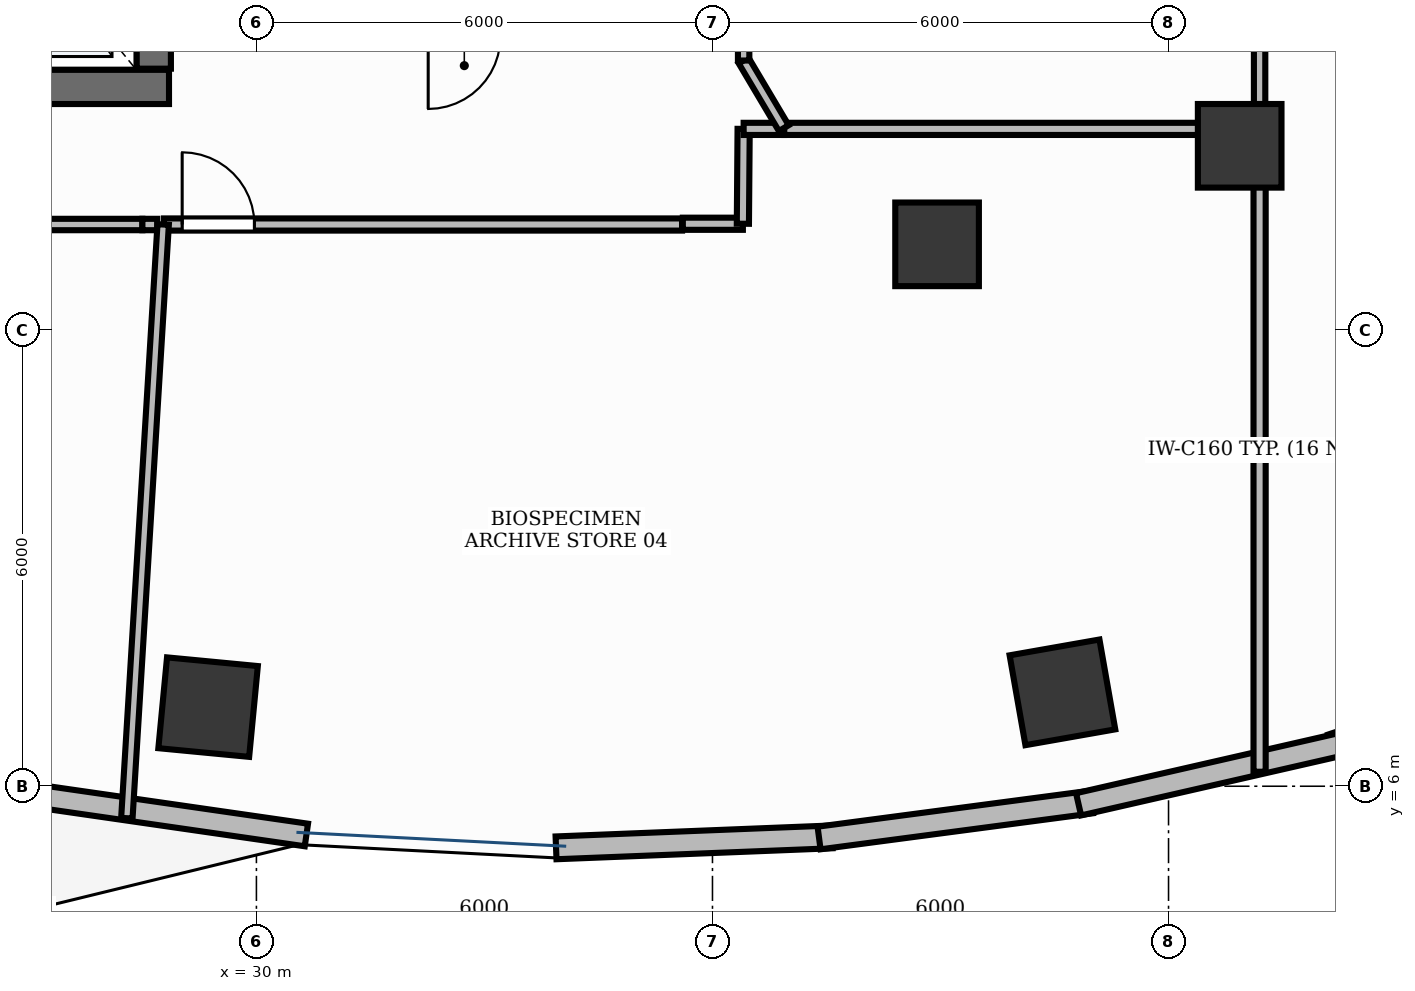
"""IFC4 building model, lengths in metres.
Left out: names, types, materials, properties, quantities, classifications, styles, units other than length and angle.
Written with IfcOpenShell. Run it as: python <this file> out.ifc"""

import sys

from ifc_helpers import new_model, si_unit, direction, frame, frame_2d, origin, origin_2d, place, context, subcontext, project, spatial, rectangle, extrude, element, fill, save


model = new_model("IFC4")
c1 = context("Model", 3, precision=1e-05, world=origin(), true_north=direction((0.0, 1.0)))
c2 = subcontext(c1, "Body", "Model", "MODEL_VIEW")
j1 = project(units=[si_unit("LENGTHUNIT", "METRE"), si_unit("PLANEANGLEUNIT", "RADIAN")], contexts=[c1])
p1 = place(None, origin())
s1 = spatial("IfcSite", under=j1, at=p1, CompositionType="ELEMENT")
p2 = place(p1, origin())
s2 = spatial("IfcBuilding", under=s1, at=p2, CompositionType="ELEMENT")
p3 = place(p2, frame((0.0, 0.0, 144.6)))
s3 = spatial("IfcBuildingStorey", under=s2, at=p3, CompositionType="ELEMENT", Elevation=144.6)
p4 = place(p3, frame((25.75, 15.2, 0.0), z_axis=(0.0, 0.0, 1.0), x_axis=(1.0, 0.0, 0.0)))
e1 = element("IfcWall", 1, at=p4, inside=s3, PredefinedType="SHEAR", context=c2, shape_type="SweptSolid", body=[
    extrude(rectangle(XDim=3.1, YDim=0.45, at=frame_2d((1.55, 0.0))), origin(), (0.0, 0.0, 1.0), 3.88),
])
p5 = place(p3, frame((28.65, 15.44, 0.0), z_axis=(0.0, 0.0, 1.0), x_axis=(0.0, 1.0, 0.0)))
e2 = element("IfcWall", 2, at=p5, inside=s3, PredefinedType="SHEAR", context=c2, shape_type="SweptSolid", body=[
    extrude(rectangle(XDim=2.7, YDim=0.45, at=frame_2d((1.35, 0.0))), origin(), (0.0, 0.0, 1.0), 3.88),
])
for number, where, z_axis, x_axis in (
    (3, (29.364, 7.041, -0.0), (0.0, 0.0, 1.0), (-0.995, 0.095, 0.0)),
    (4, (40.604, 7.235, -0.0), (0.0, 0.0, 1.0), (0.985, 0.173, 0.0)),
):
    element("IfcColumn", number, at=place(p3, frame(where, z_axis=z_axis, x_axis=x_axis)), inside=s3, PredefinedType="COLUMN", context=c2, shape_type="SweptSolid", body=[
        extrude(rectangle(XDim=1.2, YDim=1.2, at=origin_2d()), origin(), (0.0, 0.0, 1.0), 3.881),
    ])
for number, where, z_axis, x_axis in (
    (5, (38.955, 13.129, -0.0), (0.0, 0.0, 1.0), (1.0, 0.0, 0.0)),
    (6, (42.936, 14.425, -0.0), (0.0, 0.0, 1.0), (1.0, 0.0, 0.0)),
):
    element("IfcColumn", number, at=place(p3, frame(where, z_axis=z_axis, x_axis=x_axis)), inside=s3, PredefinedType="COLUMN", context=c2, shape_type="SweptSolid", body=[
        extrude(rectangle(XDim=1.1, YDim=1.1, at=origin_2d()), origin(), (0.0, 0.0, 1.0), 3.881),
    ])
p6 = place(p3, frame((44.147, 6.538, 0.0), z_axis=(0.0, 0.0, 1.0), x_axis=(0.948949854506, 0.315426970364, 0.0)))
e7 = element("IfcWall", 7, at=p6, inside=s3, PredefinedType="STANDARD", context=c2, shape_type="SweptSolid", body=[
    extrude(rectangle(XDim=3.476, YDim=0.3, at=frame_2d((1.738, 0.0))), origin(), (0.0, 0.0, 1.0), 3.88),
])
p7 = place(p6, frame((0.838, 0.0, 0.9)))
e8 = element("IfcOpeningElement", 8, at=p7, cuts=e7, PredefinedType="OPENING", context=c2, shape_type="SweptSolid", body=[
    extrude(rectangle(XDim=1.8, YDim=2.1, at=frame_2d((0.9, 1.05))), frame((0.0, 0.165, 0.0), z_axis=(0.0, -1.0, 0.0), x_axis=(1.0, 0.0, 0.0)), (0.0, 0.0, 1.0), 0.33),
])
p8 = place(p3, frame((27.083, 5.875, 0.0), z_axis=(0.0, 0.0, 1.0), x_axis=(0.989734732902, -0.142916613754, 0.0)))
e9 = element("IfcWall", 9, at=p8, inside=s3, PredefinedType="STANDARD", context=c2, shape_type="SweptSolid", body=[
    extrude(rectangle(XDim=3.611, YDim=0.3, at=frame_2d((1.806, 0.0))), origin(), (0.0, 0.0, 1.0), 3.88),
])
p9 = place(p3, frame((33.942, 5.189, 0.0), z_axis=(0.0, 0.0, 1.0), x_axis=(0.999212076676, 0.039689114679, 0.0)))
e10 = element("IfcWall", 10, at=p9, inside=s3, PredefinedType="STANDARD", context=c2, shape_type="SweptSolid", body=[
    extrude(rectangle(XDim=3.635, YDim=0.3, at=frame_2d((1.818, 0.0))), origin(), (0.0, 0.0, 1.0), 3.88),
])
p10 = place(p3, frame((37.402, 5.319, 0.0), z_axis=(0.0, 0.0, 1.0), x_axis=(0.991372969521, 0.131071107816, 0.0)))
e11 = element("IfcWall", 11, at=p10, inside=s3, PredefinedType="STANDARD", context=c2, shape_type="SweptSolid", body=[
    extrude(rectangle(XDim=3.615, YDim=0.3, at=frame_2d((1.808, 0.0))), origin(), (0.0, 0.0, 1.0), 3.88),
])
p11 = place(p3, frame((40.816, 5.762, 0.0), z_axis=(0.0, 0.0, 1.0), x_axis=(0.974841550422, 0.222898971669, 0.0)))
e12 = element("IfcWall", 12, at=p11, inside=s3, PredefinedType="STANDARD", context=c2, shape_type="SweptSolid", body=[
    extrude(rectangle(XDim=3.575, YDim=0.3, at=frame_2d((1.788, 0.0))), origin(), (0.0, 0.0, 1.0), 3.88),
])
p12 = place(p3, frame((21.8, 13.39, 0.0), z_axis=(0.0, 0.0, 1.0), x_axis=(1.0, 0.0, 0.0)))
e13 = element("IfcWall", 13, at=p12, inside=s3, PredefinedType="PARTITIONING", context=c2, shape_type="SweptSolid", body=[
    extrude(rectangle(XDim=6.7, YDim=0.15, at=frame_2d((3.35, 0.0))), origin(), (0.0, 0.0, 1.0), 2.22),
])
p13 = place(p12, frame((0.887, 0.0, 0.0)))
e14 = element("IfcOpeningElement", 14, at=p13, cuts=e13, PredefinedType="OPENING", context=c2, shape_type="SweptSolid", body=[
    extrude(rectangle(XDim=0.95, YDim=2.15, at=frame_2d((0.475, 1.075))), frame((0.0, 0.09, 0.0), z_axis=(0.0, -1.0, 0.0), x_axis=(1.0, 0.0, 0.0)), (0.0, 0.0, 1.0), 0.18),
])
p14 = place(p3, frame((28.783, 13.39, 0.0), z_axis=(0.0, 0.0, 1.0), x_axis=(1.0, 0.0, 0.0)))
e15 = element("IfcWall", 15, at=p14, inside=s3, PredefinedType="PARTITIONING", context=c2, shape_type="SweptSolid", body=[
    extrude(rectangle(XDim=6.817, YDim=0.16, at=frame_2d((3.408, 0.0))), origin(), (0.0, 0.0, 1.0), 2.22),
])
p15 = place(p14, frame((0.24, 0.0, 0.0)))
e16 = element("IfcOpeningElement", 16, at=p15, cuts=e15, PredefinedType="OPENING", context=c2, shape_type="SweptSolid", body=[
    extrude(rectangle(XDim=0.95, YDim=2.15, at=frame_2d((0.475, 1.075))), frame((0.0, 0.095, 0.0), z_axis=(0.0, -1.0, 0.0), x_axis=(1.0, 0.0, 0.0)), (0.0, 0.0, 1.0), 0.19),
])
p16 = place(p3, frame((28.5, 13.39, 0.0), z_axis=(0.0, 0.0, 1.0), x_axis=(1.0, 0.0, 0.0)))
e17 = element("IfcWall", 17, at=p16, inside=s3, PredefinedType="PARTITIONING", context=c2, shape_type="SweptSolid", body=[
    extrude(rectangle(XDim=0.195, YDim=0.15, at=frame_2d((0.098, 0.0))), origin(), (0.0, 0.0, 1.0), 2.22),
])
p17 = place(p3, frame((28.773, 13.39, 0.0), z_axis=(0.0, 0.0, 1.0), x_axis=(-0.061057412428, -0.998134255693, 0.0)))
e18 = element("IfcWall", 18, at=p17, inside=s3, PredefinedType="PARTITIONING", context=c2, shape_type="SweptSolid", body=[
    extrude(rectangle(XDim=7.825, YDim=0.15, at=frame_2d((3.913, 0.0))), origin(), (0.0, 0.0, 1.0), 2.22),
])
p18 = place(p3, frame((36.944, 14.648, 0.0), z_axis=(0.0, 0.0, 1.0), x_axis=(1.0, 0.0, 0.0)))
e19 = element("IfcWall", 19, at=p18, inside=s3, PredefinedType="PARTITIONING", context=c2, shape_type="SweptSolid", body=[
    extrude(rectangle(XDim=6.254, YDim=0.16, at=frame_2d((3.127, 0.0))), origin(), (0.0, 0.0, 1.0), 2.22),
])
p19 = place(p3, frame((43.198, 14.648, 0.0), z_axis=(0.0, 0.0, 1.0), x_axis=(0.0, -1.0, 0.0)))
e20 = element("IfcWall", 20, at=p19, inside=s3, PredefinedType="PARTITIONING", context=c2, shape_type="SweptSolid", body=[
    extrude(rectangle(XDim=8.457, YDim=0.16, at=frame_2d((4.229, 0.0))), origin(), (0.0, 0.0, 1.0), 2.22),
])
p20 = place(p3, frame((35.61, 13.4, 0.0), z_axis=(0.0, 0.0, 1.0), x_axis=(1.0, 0.0, 0.0)))
e21 = element("IfcWall", 21, at=p20, inside=s3, PredefinedType="PARTITIONING", context=c2, shape_type="SweptSolid", body=[
    extrude(rectangle(XDim=0.79, YDim=0.16, at=frame_2d((0.395, 0.0))), origin(), (0.0, 0.0, 1.0), 2.22),
])
p21 = place(p3, frame((36.4, 13.4, 0.0), z_axis=(0.0, 0.0, 1.0), x_axis=(0.008020086342, 0.99996783859, 0.0)))
e22 = element("IfcWall", 22, at=p21, inside=s3, PredefinedType="PARTITIONING", context=c2, shape_type="SweptSolid", body=[
    extrude(rectangle(XDim=1.248, YDim=0.16, at=frame_2d((0.624, 0.0))), origin(), (0.0, 0.0, 1.0), 2.22),
])
p22 = place(p3, frame((36.41, 14.648, 0.0), z_axis=(0.0, 0.0, 1.0), x_axis=(1.0, 0.0, 0.0)))
e23 = element("IfcWall", 23, at=p22, inside=s3, PredefinedType="PARTITIONING", context=c2, shape_type="SweptSolid", body=[
    extrude(rectangle(XDim=0.53, YDim=0.16, at=frame_2d((0.265, 0.0))), origin(), (0.0, 0.0, 1.0), 2.22),
])
p23 = place(p3, frame((36.938, 14.658, 0.0), z_axis=(0.0, 0.0, 1.0), x_axis=(-0.510604172379, 0.859815898405, 0.0)))
e24 = element("IfcWall", 24, at=p23, inside=s3, PredefinedType="PARTITIONING", context=c2, shape_type="SweptSolid", body=[
    extrude(rectangle(XDim=1.035, YDim=0.15, at=frame_2d((0.517, 0.0))), origin(), (0.0, 0.0, 1.0), 2.22),
])
p24 = place(p3, frame((36.41, 15.548, 0.0), z_axis=(0.0, 0.0, 1.0), x_axis=(0.0, 1.0, 0.0)))
e25 = element("IfcWall", 25, at=p24, inside=s3, PredefinedType="PARTITIONING", context=c2, shape_type="SweptSolid", body=[
    extrude(rectangle(XDim=0.302, YDim=0.15, at=frame_2d((0.151, 0.0))), origin(), (0.0, 0.0, 1.0), 2.22),
])
p25 = place(p3, frame((43.198, 16.49, 0.0), z_axis=(0.0, 0.0, 1.0), x_axis=(0.0, -1.0, 0.0)))
e26 = element("IfcWall", 26, at=p25, inside=s3, PredefinedType="PARTITIONING", context=c2, shape_type="SweptSolid", body=[
    extrude(rectangle(XDim=1.832, YDim=0.15, at=frame_2d((0.916, 0.0))), origin(), (0.0, 0.0, 1.0), 2.22),
])
p26 = place(p15, origin())
e27 = element("IfcDoor", 27, at=p26, inside=s3, OperationType="SINGLE_SWING_LEFT", PredefinedType="DOOR", context=c2, shape_type="SweptSolid", body=[
    extrude(rectangle(XDim=0.95, YDim=2.15, at=frame_2d((0.475, 1.075))), frame((0.0, 0.025, 0.0), z_axis=(0.0, -1.0, 0.0), x_axis=(1.0, 0.0, 0.0)), (0.0, 0.0, 1.0), 0.05),
])
fill(e16, e27)
save(model, sys.argv[1])
